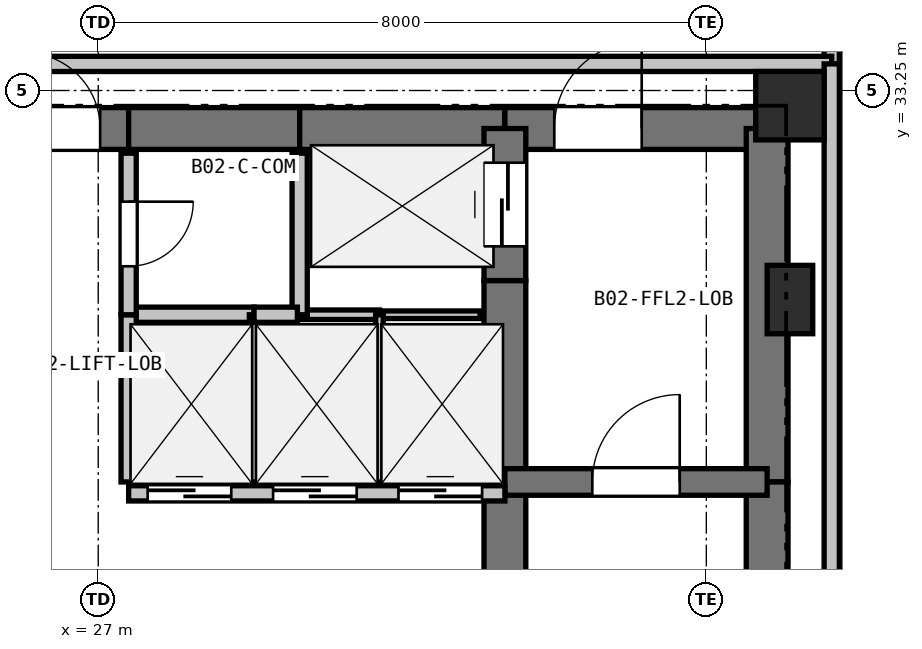
"""IFC4 building model, lengths in metres.
Left out: names, types, materials, properties, quantities, classifications, styles, units other than length and angle.
Written with IfcOpenShell. Run it as: python <this file> out.ifc"""

import sys

from ifc_helpers import new_model, si_unit, direction, frame, frame_2d, origin, origin_2d, place, context, subcontext, project, spatial, rectangle, extrude, element, fill, save


model = new_model("IFC4")
c1 = context("Model", 3, precision=1e-05, world=origin(), true_north=direction((0.0, 1.0)))
c2 = subcontext(c1, "Body", "Model", "MODEL_VIEW")
j1 = project(units=[si_unit("LENGTHUNIT", "METRE"), si_unit("PLANEANGLEUNIT", "RADIAN")], contexts=[c1])
p1 = place(None, origin())
s1 = spatial("IfcSite", under=j1, at=p1, CompositionType="ELEMENT")
p2 = place(p1, origin())
s2 = spatial("IfcBuilding", under=s1, at=p2, CompositionType="ELEMENT")
p3 = place(p2, frame((0.0, 0.0, -9.0)))
s3 = spatial("IfcBuildingStorey", under=s2, at=p3, CompositionType="ELEMENT", Elevation=-9.0)
p4 = place(p3, frame((36.1, 33.05, 0.0), z_axis=(0.0, 0.0, 1.0), x_axis=(1.0, 0.0, 0.0)))
e1 = element("IfcColumn", 1, at=p4, inside=s3, PredefinedType="COLUMN", context=c2, shape_type="SweptSolid", body=[
    extrude(rectangle(XDim=0.9, YDim=0.9, at=origin_2d()), origin(), (0.0, 0.0, 1.0), 4.5),
])
p5 = place(p3, frame((36.1, 30.5, 0.0), z_axis=(0.0, 0.0, 1.0), x_axis=(1.0, 0.0, 0.0)))
e2 = element("IfcColumn", 2, at=p5, inside=s3, PredefinedType="PILASTER", context=c2, shape_type="SweptSolid", body=[
    extrude(rectangle(XDim=0.6, YDim=0.9, at=origin_2d()), origin(), (0.0, 0.0, 1.0), 4.5),
])
p6 = place(p3, frame((25.65, 32.75, 0.0), z_axis=(0.0, 0.0, 1.0), x_axis=(1.0, 0.0, 0.0)))
e3 = element("IfcWall", 3, at=p6, inside=s3, PredefinedType="SHEAR", context=c2, shape_type="SweptSolid", body=[
    extrude(rectangle(XDim=1.75, YDim=0.55, at=frame_2d((0.875, 0.0))), origin(), (0.0, 0.0, 1.0), 4.2),
])
p7 = place(p6, frame((0.375, 0.0, 0.0)))
e4 = element("IfcOpeningElement", 4, at=p7, cuts=e3, PredefinedType="OPENING", context=c2, shape_type="SweptSolid", body=[
    extrude(rectangle(XDim=1.0, YDim=2.15, at=frame_2d((0.5, 1.075))), frame((0.0, 0.285, 0.0), z_axis=(0.0, -1.0, 0.0), x_axis=(1.0, 0.0, 0.0)), (0.0, 0.0, 1.0), 0.57),
])
p8 = place(p3, frame((27.4, 32.75, 0.0), z_axis=(0.0, 0.0, 1.0), x_axis=(1.0, 0.0, 0.0)))
e5 = element("IfcWall", 5, at=p8, inside=s3, PredefinedType="SHEAR", context=c2, shape_type="SweptSolid", body=[
    extrude(rectangle(XDim=2.25, YDim=0.55, at=frame_2d((1.125, 0.0))), origin(), (0.0, 0.0, 1.0), 4.2),
])
p9 = place(p3, frame((29.65, 32.75, 0.0), z_axis=(0.0, 0.0, 1.0), x_axis=(1.0, 0.0, 0.0)))
e6 = element("IfcWall", 6, at=p9, inside=s3, PredefinedType="SHEAR", context=c2, shape_type="SweptSolid", body=[
    extrude(rectangle(XDim=2.7, YDim=0.55, at=frame_2d((1.35, 0.0))), origin(), (0.0, 0.0, 1.0), 4.2),
])
p10 = place(p3, frame((32.35, 32.75, 0.0), z_axis=(0.0, 0.0, 1.0), x_axis=(1.0, 0.0, 0.0)))
e7 = element("IfcWall", 7, at=p10, inside=s3, PredefinedType="SHEAR", context=c2, shape_type="SweptSolid", body=[
    extrude(rectangle(XDim=3.45, YDim=0.55, at=frame_2d((1.725, 0.0))), origin(), (0.0, 0.0, 1.0), 4.2),
])
p11 = place(p10, frame((0.65, 0.0, 0.0)))
e8 = element("IfcOpeningElement", 8, at=p11, cuts=e7, PredefinedType="OPENING", context=c2, shape_type="SweptSolid", body=[
    extrude(rectangle(XDim=1.15, YDim=2.15, at=frame_2d((0.575, 1.075))), frame((0.0, 0.285, 0.0), z_axis=(0.0, -1.0, 0.0), x_axis=(1.0, 0.0, 0.0)), (0.0, 0.0, 1.0), 0.57),
])
p12 = place(p3, frame((35.8, 32.75, 0.0), z_axis=(0.0, 0.0, 1.0), x_axis=(0.0, -1.0, 0.0)))
e9 = element("IfcWall", 9, at=p12, inside=s3, PredefinedType="SHEAR", context=c2, shape_type="SweptSolid", body=[
    extrude(rectangle(XDim=4.65, YDim=0.55, at=frame_2d((2.325, 0.0))), origin(), (0.0, 0.0, 1.0), 4.2),
])
p13 = place(p3, frame((35.8, 28.1, 0.0), z_axis=(0.0, 0.0, 1.0), x_axis=(0.0, -1.0, 0.0)))
e10 = element("IfcWall", 10, at=p13, inside=s3, PredefinedType="SHEAR", context=c2, shape_type="SweptSolid", body=[
    extrude(rectangle(XDim=7.35, YDim=0.55, at=frame_2d((3.675, 0.0))), origin(), (0.0, 0.0, 1.0), 4.2),
])
p14 = place(p3, frame((32.35, 25.55, 0.0), z_axis=(0.0, 0.0, 1.0), x_axis=(0.0, 1.0, 0.0)))
e11 = element("IfcWall", 11, at=p14, inside=s3, PredefinedType="SHEAR", context=c2, shape_type="SweptSolid", body=[
    extrude(rectangle(XDim=2.4, YDim=0.55, at=frame_2d((1.2, 0.0))), origin(), (0.0, 0.0, 1.0), 4.2),
])
p15 = place(p3, frame((32.35, 27.95, 0.0), z_axis=(0.0, 0.0, 1.0), x_axis=(0.0, 1.0, 0.0)))
e12 = element("IfcWall", 12, at=p15, inside=s3, PredefinedType="SHEAR", context=c2, shape_type="SweptSolid", body=[
    extrude(rectangle(XDim=2.8, YDim=0.55, at=frame_2d((1.4, 0.0))), origin(), (0.0, 0.0, 1.0), 4.2),
])
p16 = place(p3, frame((32.35, 30.75, 0.0), z_axis=(0.0, 0.0, 1.0), x_axis=(0.0, 1.0, 0.0)))
e13 = element("IfcWall", 13, at=p16, inside=s3, PredefinedType="SHEAR", context=c2, shape_type="SweptSolid", body=[
    extrude(rectangle(XDim=2.0, YDim=0.55, at=frame_2d((1.0, 0.0))), origin(), (0.0, 0.0, 1.0), 4.2),
])
p17 = place(p16, frame((0.45, 0.0, 0.0)))
e14 = element("IfcOpeningElement", 14, at=p17, cuts=e13, PredefinedType="OPENING", context=c2, shape_type="SweptSolid", body=[
    extrude(rectangle(XDim=1.1, YDim=2.15, at=frame_2d((0.55, 1.075))), frame((0.0, 0.285, 0.0), z_axis=(0.0, -1.0, 0.0), x_axis=(1.0, 0.0, 0.0)), (0.0, 0.0, 1.0), 0.57),
])
p18 = place(p3, frame((32.35, 28.1, 0.0), z_axis=(0.0, 0.0, 1.0), x_axis=(1.0, 0.0, 0.0)))
e15 = element("IfcWall", 15, at=p18, inside=s3, PredefinedType="SHEAR", context=c2, shape_type="SweptSolid", body=[
    extrude(rectangle(XDim=3.45, YDim=0.35, at=frame_2d((1.725, 0.0))), origin(), (0.0, 0.0, 1.0), 4.2),
])
p19 = place(p18, frame((1.15, 0.0, 0.0)))
e16 = element("IfcOpeningElement", 16, at=p19, cuts=e15, PredefinedType="OPENING", context=c2, shape_type="SweptSolid", body=[
    extrude(rectangle(XDim=1.15, YDim=2.15, at=frame_2d((0.575, 1.075))), frame((0.0, 0.185, 0.0), z_axis=(0.0, -1.0, 0.0), x_axis=(1.0, 0.0, 0.0)), (0.0, 0.0, 1.0), 0.37),
])
p20 = place(p3, frame((27.4, 27.95, 0.0), z_axis=(0.0, 0.0, 1.0), x_axis=(1.0, 0.0, 0.0)))
e17 = element("IfcWall", 17, at=p20, inside=s3, PredefinedType="PARTITIONING", context=c2, shape_type="SweptSolid", body=[
    extrude(rectangle(XDim=4.95, YDim=0.2, at=frame_2d((2.475, 0.0))), origin(), (0.0, 0.0, 1.0), 4.2),
])
p21 = place(p20, frame((0.25, 0.0, 0.0)))
e18 = element("IfcOpeningElement", 18, at=p21, cuts=e17, PredefinedType="OPENING", context=c2, shape_type="SweptSolid", body=[
    extrude(rectangle(XDim=1.1, YDim=2.15, at=frame_2d((0.55, 1.075))), frame((0.0, 0.11, 0.0), z_axis=(0.0, -1.0, 0.0), x_axis=(1.0, 0.0, 0.0)), (0.0, 0.0, 1.0), 0.22),
])
p22 = place(p20, frame((1.9, 0.0, 0.0)))
e19 = element("IfcOpeningElement", 19, at=p22, cuts=e17, PredefinedType="OPENING", context=c2, shape_type="SweptSolid", body=[
    extrude(rectangle(XDim=1.1, YDim=2.15, at=frame_2d((0.55, 1.075))), frame((0.0, 0.11, 0.0), z_axis=(0.0, -1.0, 0.0), x_axis=(1.0, 0.0, 0.0)), (0.0, 0.0, 1.0), 0.22),
])
p23 = place(p20, frame((3.55, 0.0, 0.0)))
e20 = element("IfcOpeningElement", 20, at=p23, cuts=e17, PredefinedType="OPENING", context=c2, shape_type="SweptSolid", body=[
    extrude(rectangle(XDim=1.1, YDim=2.15, at=frame_2d((0.55, 1.075))), frame((0.0, 0.11, 0.0), z_axis=(0.0, -1.0, 0.0), x_axis=(1.0, 0.0, 0.0)), (0.0, 0.0, 1.0), 0.22),
])
p24 = place(p3, frame((32.025, 30.3, 0.0), z_axis=(0.0, 0.0, 1.0), x_axis=(-1.0, 0.0, 0.0)))
e21 = element("IfcWall", 21, at=p24, inside=s3, PredefinedType="PARTITIONING", context=c2, shape_type="SweptSolid", body=[
    extrude(rectangle(XDim=1.325, YDim=0.1, at=frame_2d((0.663, 0.0))), origin(), (0.0, 0.0, 1.0), 4.2),
])
p25 = place(p3, frame((30.7, 30.3, 0.0), z_axis=(0.0, 0.0, 1.0), x_axis=(-1.0, 0.0, 0.0)))
e22 = element("IfcWall", 22, at=p25, inside=s3, PredefinedType="PARTITIONING", context=c2, shape_type="SweptSolid", body=[
    extrude(rectangle(XDim=1.05, YDim=0.125, at=frame_2d((0.525, 0.0))), origin(), (0.0, 0.0, 1.0), 4.2),
])
p26 = place(p3, frame((29.65, 30.3, 0.0), z_axis=(0.0, 0.0, 1.0), x_axis=(0.0, 1.0, 0.0)))
e23 = element("IfcWall", 23, at=p26, inside=s3, PredefinedType="PARTITIONING", context=c2, shape_type="SweptSolid", body=[
    extrude(rectangle(XDim=2.125, YDim=0.2, at=frame_2d((1.062, 0.0))), origin(), (0.0, 0.0, 1.0), 4.2),
])
p27 = place(p3, frame((27.4, 30.3, 0.0), z_axis=(0.0, 0.0, 1.0), x_axis=(1.0, 0.0, 0.0)))
e24 = element("IfcWall", 24, at=p27, inside=s3, PredefinedType="PARTITIONING", context=c2, shape_type="SweptSolid", body=[
    extrude(rectangle(XDim=1.65, YDim=0.2, at=frame_2d((0.825, 0.0))), origin(), (0.0, 0.0, 1.0), 4.2),
])
p28 = place(p3, frame((29.05, 30.3, 0.0), z_axis=(0.0, 0.0, 1.0), x_axis=(0.0, -1.0, 0.0)))
e25 = element("IfcWall", 25, at=p28, inside=s3, PredefinedType="PARTITIONING", context=c2, shape_type="SweptSolid", body=[
    extrude(rectangle(XDim=2.2, YDim=0.125, at=frame_2d((1.1, 0.0))), origin(), (0.0, 0.0, 1.0), 4.2),
])
p29 = place(p3, frame((27.4, 28.1, 0.0), z_axis=(0.0, 0.0, 1.0), x_axis=(0.0, 1.0, 0.0)))
e26 = element("IfcWall", 26, at=p29, inside=s3, PredefinedType="PARTITIONING", context=c2, shape_type="SweptSolid", body=[
    extrude(rectangle(XDim=2.2, YDim=0.2, at=frame_2d((1.1, 0.0))), origin(), (0.0, 0.0, 1.0), 4.2),
])
p30 = place(p3, frame((29.05, 30.3, 0.0), z_axis=(0.0, 0.0, 1.0), x_axis=(1.0, 0.0, 0.0)))
e27 = element("IfcWall", 27, at=p30, inside=s3, PredefinedType="PARTITIONING", context=c2, shape_type="SweptSolid", body=[
    extrude(rectangle(XDim=0.57, YDim=0.2, at=frame_2d((0.285, 0.0))), origin(), (0.0, 0.0, 1.0), 4.2),
])
p31 = place(p3, frame((30.7, 30.3, 0.0), z_axis=(0.0, 0.0, 1.0), x_axis=(0.0, -1.0, 0.0)))
e28 = element("IfcWall", 28, at=p31, inside=s3, PredefinedType="PARTITIONING", context=c2, shape_type="SweptSolid", body=[
    extrude(rectangle(XDim=2.2, YDim=0.1, at=frame_2d((1.1, 0.0))), origin(), (0.0, 0.0, 1.0), 4.2),
])
p32 = place(p3, frame((27.4, 32.425, 0.0), z_axis=(0.0, 0.0, 1.0), x_axis=(0.0, -1.0, 0.0)))
e29 = element("IfcWall", 29, at=p32, inside=s3, PredefinedType="PARTITIONING", context=c2, shape_type="SweptSolid", body=[
    extrude(rectangle(XDim=2.125, YDim=0.2, at=frame_2d((1.062, 0.0))), origin(), (0.0, 0.0, 1.0), 4.2),
])
p33 = place(p32, frame((0.637, 0.0, 0.0)))
e30 = element("IfcOpeningElement", 30, at=p33, cuts=e29, PredefinedType="OPENING", context=c2, shape_type="SweptSolid", body=[
    extrude(rectangle(XDim=0.85, YDim=2.1, at=frame_2d((0.425, 1.05))), frame((0.0, 0.11, 0.0), z_axis=(0.0, -1.0, 0.0), x_axis=(1.0, 0.0, 0.0)), (0.0, 0.0, 1.0), 0.22),
])
p34 = place(p3, frame((36.65, 35.4, 0.0), z_axis=(0.0, 0.0, 1.0), x_axis=(0.0, -1.0, 0.0)))
e31 = element("IfcWall", 31, at=p34, inside=s3, PredefinedType="PARTITIONING", context=c2, shape_type="SweptSolid", body=[
    extrude(rectangle(XDim=1.8, YDim=0.2, at=frame_2d((0.9, 0.0))), origin(), (0.0, 0.0, 1.0), 4.2),
])
p35 = place(p34, frame((0.4, 0.0, 0.0)))
e32 = element("IfcOpeningElement", 32, at=p35, cuts=e31, PredefinedType="OPENING", context=c2, shape_type="SweptSolid", body=[
    extrude(rectangle(XDim=1.0, YDim=2.15, at=frame_2d((0.5, 1.075))), frame((0.0, 0.11, 0.0), z_axis=(0.0, -1.0, 0.0), x_axis=(1.0, 0.0, 0.0)), (0.0, 0.0, 1.0), 0.22),
])
p36 = place(p3, frame((36.65, 33.6, 0.0), z_axis=(0.0, 0.0, 1.0), x_axis=(-1.0, 0.0, 0.0)))
e33 = element("IfcWall", 33, at=p36, inside=s3, PredefinedType="PARTITIONING", context=c2, shape_type="SweptSolid", body=[
    extrude(rectangle(XDim=15.3, YDim=0.2, at=frame_2d((7.65, 0.0))), origin(), (0.0, 0.0, 1.0), 4.2),
])
p37 = place(p3, frame((36.65, 19.9, 0.0), z_axis=(0.0, 0.0, 1.0), x_axis=(0.0, 1.0, 0.0)))
e34 = element("IfcWall", 34, at=p37, inside=s3, PredefinedType="PARTITIONING", context=c2, shape_type="SweptSolid", body=[
    extrude(rectangle(XDim=13.7, YDim=0.2, at=frame_2d((6.85, 0.0))), origin(), (0.0, 0.0, 1.0), 4.2),
])
p38 = place(p21, origin())
e35 = element("IfcDoor", 35, at=p38, inside=s3, OperationType="SLIDING_TO_LEFT", PredefinedType="DOOR", context=c2, shape_type="SweptSolid", body=[
    extrude(rectangle(XDim=1.1, YDim=2.15, at=frame_2d((0.55, 1.075))), frame((0.0, 0.025, 0.0), z_axis=(0.0, -1.0, 0.0), x_axis=(1.0, 0.0, 0.0)), (0.0, 0.0, 1.0), 0.05),
])
fill(e18, e35)
p39 = place(p22, origin())
e36 = element("IfcDoor", 36, at=p39, inside=s3, OperationType="SLIDING_TO_LEFT", PredefinedType="DOOR", context=c2, shape_type="SweptSolid", body=[
    extrude(rectangle(XDim=1.1, YDim=2.15, at=frame_2d((0.55, 1.075))), frame((0.0, 0.025, 0.0), z_axis=(0.0, -1.0, 0.0), x_axis=(1.0, 0.0, 0.0)), (0.0, 0.0, 1.0), 0.05),
])
fill(e19, e36)
p40 = place(p23, origin())
e37 = element("IfcDoor", 37, at=p40, inside=s3, OperationType="SLIDING_TO_LEFT", PredefinedType="DOOR", context=c2, shape_type="SweptSolid", body=[
    extrude(rectangle(XDim=1.1, YDim=2.15, at=frame_2d((0.55, 1.075))), frame((0.0, 0.025, 0.0), z_axis=(0.0, -1.0, 0.0), x_axis=(1.0, 0.0, 0.0)), (0.0, 0.0, 1.0), 0.05),
])
fill(e20, e37)
p41 = place(p7, origin())
e38 = element("IfcDoor", 38, at=p41, inside=s3, OperationType="SINGLE_SWING_LEFT", PredefinedType="DOOR", context=c2, shape_type="SweptSolid", body=[
    extrude(rectangle(XDim=1.0, YDim=2.15, at=frame_2d((0.5, 1.075))), frame((0.0, 0.025, 0.0), z_axis=(0.0, -1.0, 0.0), x_axis=(1.0, 0.0, 0.0)), (0.0, 0.0, 1.0), 0.05),
])
fill(e4, e38)
p42 = place(p17, origin())
e39 = element("IfcDoor", 39, at=p42, inside=s3, OperationType="SLIDING_TO_LEFT", PredefinedType="DOOR", context=c2, shape_type="SweptSolid", body=[
    extrude(rectangle(XDim=1.1, YDim=2.15, at=frame_2d((0.55, 1.075))), frame((0.0, 0.025, 0.0), z_axis=(0.0, -1.0, 0.0), x_axis=(1.0, 0.0, 0.0)), (0.0, 0.0, 1.0), 0.05),
])
fill(e14, e39)
p43 = place(p19, origin())
e40 = element("IfcDoor", 40, at=p43, inside=s3, OperationType="SINGLE_SWING_RIGHT", PredefinedType="DOOR", context=c2, shape_type="SweptSolid", body=[
    extrude(rectangle(XDim=1.15, YDim=2.15, at=frame_2d((0.575, 1.075))), frame((0.0, 0.025, 0.0), z_axis=(0.0, -1.0, 0.0), x_axis=(1.0, 0.0, 0.0)), (0.0, 0.0, 1.0), 0.05),
])
fill(e16, e40)
p44 = place(p11, origin())
e41 = element("IfcDoor", 41, at=p44, inside=s3, OperationType="SINGLE_SWING_RIGHT", PredefinedType="DOOR", context=c2, shape_type="SweptSolid", body=[
    extrude(rectangle(XDim=1.15, YDim=2.15, at=frame_2d((0.575, 1.075))), frame((0.0, 0.025, 0.0), z_axis=(0.0, -1.0, 0.0), x_axis=(1.0, 0.0, 0.0)), (0.0, 0.0, 1.0), 0.05),
])
fill(e8, e41)
p45 = place(p33, origin())
e42 = element("IfcDoor", 42, at=p45, inside=s3, OperationType="SINGLE_SWING_LEFT", PredefinedType="DOOR", context=c2, shape_type="SweptSolid", body=[
    extrude(rectangle(XDim=0.85, YDim=2.1, at=frame_2d((0.425, 1.05))), frame((0.0, 0.025, 0.0), z_axis=(0.0, -1.0, 0.0), x_axis=(1.0, 0.0, 0.0)), (0.0, 0.0, 1.0), 0.05),
])
fill(e30, e42)
save(model, sys.argv[1])
